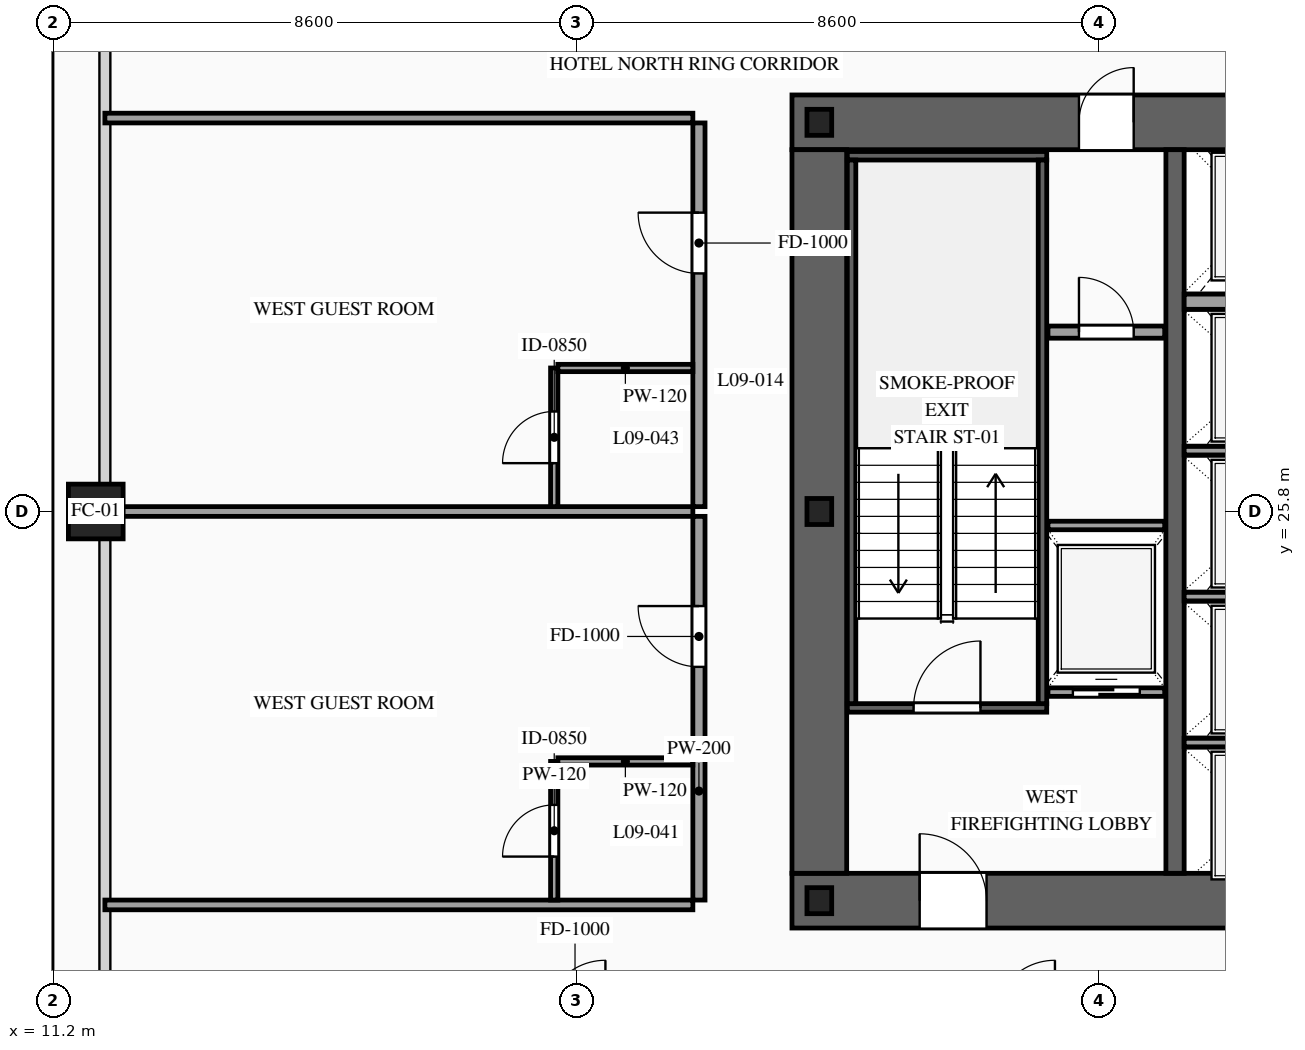
"""IFC4 building model, lengths in metres.
Left out: names, types, materials, properties, quantities, classifications, styles, units other than length and angle.
Written with IfcOpenShell. Run it as: python <this file> out.ifc"""

import sys

from ifc_helpers import new_model, si_unit, direction, frame, frame_2d, origin, origin_2d, place, context, subcontext, project, spatial, rectangle, hollow_rectangle, i_section, extrude, source, transform, mapped, element, fill, save


model = new_model("IFC4")
c1 = context("Model", 3, precision=1e-05, world=origin(), true_north=direction((0.0, 1.0)))
c2 = subcontext(c1, "Body", "Model", "MODEL_VIEW")
j1 = project(units=[si_unit("LENGTHUNIT", "METRE"), si_unit("PLANEANGLEUNIT", "RADIAN")], contexts=[c1])
p1 = place(None, origin())
s1 = spatial("IfcSite", under=j1, at=p1, CompositionType="ELEMENT")
p2 = place(p1, origin())
s2 = spatial("IfcBuilding", under=s1, at=p2, CompositionType="ELEMENT")
p3 = place(p2, frame((0.0, 0.0, 37.8)))
s3 = spatial("IfcBuildingStorey", under=s2, at=p3, CompositionType="ELEMENT", Elevation=37.8)
p4 = place(p3, frame((23.35, 19.4, 0.0), z_axis=(0.0, 0.0, 1.0), x_axis=(1.0, 0.0, 0.0)))
e1 = element("IfcWall", 1, at=p4, inside=s3, PredefinedType="SHEAR", context=c2, shape_type="SweptSolid", body=[
    extrude(rectangle(XDim=27.3, YDim=0.9, at=frame_2d((13.65, 0.0))), origin(), (0.0, 0.0, 1.0), 3.6),
])
p5 = place(p4, frame((2.1, 0.0, 0.0)))
e2 = element("IfcOpeningElement", 2, at=p5, cuts=e1, PredefinedType="OPENING", context=c2, shape_type="SweptSolid", body=[
    extrude(rectangle(XDim=1.1, YDim=2.2, at=frame_2d((0.55, 1.1))), frame((0.0, 0.465, 0.0), z_axis=(0.0, -1.0, 0.0), x_axis=(1.0, 0.0, 0.0)), (0.0, 0.0, 1.0), 0.93),
])
p6 = place(p4, frame((10.0, 0.0, 0.0)))
e3 = element("IfcOpeningElement", 3, at=p6, cuts=e1, PredefinedType="OPENING", context=c2, shape_type="SweptSolid", body=[
    extrude(rectangle(XDim=1.1, YDim=2.2, at=frame_2d((0.55, 1.1))), frame((0.0, 0.465, 0.0), z_axis=(0.0, -1.0, 0.0), x_axis=(1.0, 0.0, 0.0)), (0.0, 0.0, 1.0), 0.93),
])
p7 = place(p4, frame((23.2, 0.0, 0.0)))
e4 = element("IfcOpeningElement", 4, at=p7, cuts=e1, PredefinedType="OPENING", context=c2, shape_type="SweptSolid", body=[
    extrude(rectangle(XDim=1.1, YDim=2.2, at=frame_2d((0.55, 1.1))), frame((0.0, 0.465, 0.0), z_axis=(0.0, -1.0, 0.0), x_axis=(1.0, 0.0, 0.0)), (0.0, 0.0, 1.0), 0.93),
])
p8 = place(p4, frame((19.82, 0.0, 0.0)))
e5 = element("IfcOpeningElement", 5, at=p8, cuts=e1, PredefinedType="OPENING", context=c2, shape_type="SweptSolid", body=[
    extrude(rectangle(XDim=0.9, YDim=2.15, at=frame_2d((0.45, 1.075))), frame((0.0, 0.465, 0.0), z_axis=(0.0, -1.0, 0.0), x_axis=(1.0, 0.0, 0.0)), (0.0, 0.0, 1.0), 0.93),
])
p9 = place(p4, frame((18.38, 0.0, 0.0)))
e6 = element("IfcOpeningElement", 6, at=p9, cuts=e1, PredefinedType="OPENING", context=c2, shape_type="SweptSolid", body=[
    extrude(rectangle(XDim=0.9, YDim=2.15, at=frame_2d((0.45, 1.075))), frame((0.0, 0.465, 0.0), z_axis=(0.0, -1.0, 0.0), x_axis=(1.0, 0.0, 0.0)), (0.0, 0.0, 1.0), 0.93),
])
p10 = place(p3, frame((23.35, 32.2, 0.0), z_axis=(0.0, 0.0, 1.0), x_axis=(1.0, 0.0, 0.0)))
e7 = element("IfcWall", 7, at=p10, inside=s3, PredefinedType="SHEAR", context=c2, shape_type="SweptSolid", body=[
    extrude(rectangle(XDim=27.3, YDim=0.9, at=frame_2d((13.65, 0.0))), origin(), (0.0, 0.0, 1.0), 3.6),
])
p11 = place(p10, frame((4.72, 0.0, 0.0)))
e8 = element("IfcOpeningElement", 8, at=p11, cuts=e7, PredefinedType="OPENING", context=c2, shape_type="SweptSolid", body=[
    extrude(rectangle(XDim=0.9, YDim=2.15, at=frame_2d((0.45, 1.075))), frame((0.0, 0.465, 0.0), z_axis=(0.0, -1.0, 0.0), x_axis=(1.0, 0.0, 0.0)), (0.0, 0.0, 1.0), 0.93),
])
p12 = place(p10, frame((10.0, 0.0, 0.0)))
e9 = element("IfcOpeningElement", 9, at=p12, cuts=e7, PredefinedType="OPENING", context=c2, shape_type="SweptSolid", body=[
    extrude(rectangle(XDim=1.1, YDim=2.2, at=frame_2d((0.55, 1.1))), frame((0.0, 0.465, 0.0), z_axis=(0.0, -1.0, 0.0), x_axis=(1.0, 0.0, 0.0)), (0.0, 0.0, 1.0), 0.93),
])
p13 = place(p10, frame((15.85, 0.0, 0.0)))
e10 = element("IfcOpeningElement", 10, at=p13, cuts=e7, PredefinedType="OPENING", context=c2, shape_type="SweptSolid", body=[
    extrude(rectangle(XDim=1.1, YDim=2.2, at=frame_2d((0.55, 1.1))), frame((0.0, 0.465, 0.0), z_axis=(0.0, -1.0, 0.0), x_axis=(1.0, 0.0, 0.0)), (0.0, 0.0, 1.0), 0.93),
])
m1 = source(origin(), c2, "Body", "SweptSolid", [
    extrude(rectangle(XDim=11.9, YDim=0.9, at=frame_2d((5.95, 0.0))), origin(), (0.0, 0.0, 1.0), 3.6),
])
p14 = place(p3, frame((23.8, 19.85, 0.0), z_axis=(0.0, 0.0, 1.0), x_axis=(0.0, 1.0, 0.0)))
e11 = element("IfcWall", 11, at=p14, inside=s3, PredefinedType="SHEAR", context=c2, shape_type="MappedRepresentation", body=[
    mapped(m1, transform((0.0, 0.0, 0.0), scale=1.0)),
])
m2 = source(origin(), c2, "Body", "SweptSolid", [
    extrude(rectangle(XDim=11.9, YDim=0.3, at=frame_2d((5.95, 0.0))), origin(), (0.0, 0.0, 1.0), 3.6),
])
p15 = place(p3, frame((29.65, 19.85, 0.0), z_axis=(0.0, 0.0, 1.0), x_axis=(0.0, 1.0, 0.0)))
e12 = element("IfcWall", 12, at=p15, inside=s3, PredefinedType="SOLIDWALL", context=c2, shape_type="MappedRepresentation", body=[
    mapped(m2, transform((0.0, 0.0, 0.0), scale=1.0)),
])
m3 = source(origin(), c2, "Body", "SweptSolid", [
    extrude(i_section(OverallWidth=0.407, OverallDepth=0.428, WebThickness=0.02, FlangeThickness=0.035, at=origin_2d()), origin(), (0.0, 0.0, 1.0), 3.6),
])
for number, where, z_axis, x_axis in (
    (13, (23.8, 19.4, 0.0), (0.0, 0.0, 1.0), (1.0, 0.0, 0.0)),
    (14, (23.8, 25.8, 0.0), (0.0, 0.0, 1.0), (1.0, 0.0, 0.0)),
    (15, (23.8, 32.2, 0.0), (0.0, 0.0, 1.0), (1.0, 0.0, 0.0)),
):
    element("IfcColumn", number, at=place(p3, frame(where, z_axis=z_axis, x_axis=x_axis)), inside=s3, PredefinedType="COLUMN", context=c2, shape_type="MappedRepresentation", body=[
        mapped(m3, transform((0.0, 0.0, 0.0), scale=1.0)),
    ])
m4 = source(origin(), c2, "Body", "SweptSolid", [
    extrude(hollow_rectangle(XDim=0.9, YDim=0.9, WallThickness=0.042, at=origin_2d()), origin(), (0.0, 0.0, 1.0), 3.6),
])
p16 = place(p3, frame((11.9, 25.8, 0.0), z_axis=(0.0, 0.0, 1.0), x_axis=(1.0, 0.0, 0.0)))
e16 = element("IfcColumn", 16, at=p16, inside=s3, PredefinedType="COLUMN", context=c2, shape_type="MappedRepresentation", body=[
    mapped(m4, transform((0.0, 0.0, 0.0), scale=1.0)),
])
p17 = place(p3, frame((27.56, 22.83, 0.0), z_axis=(0.0, 0.0, 1.0), x_axis=(1.0, 0.0, 0.0)))
e17 = element("IfcWall", 17, at=p17, inside=s3, PredefinedType="SOLIDWALL", context=c2, shape_type="SweptSolid", body=[
    extrude(rectangle(XDim=1.92, YDim=0.14, at=frame_2d((0.96, 0.0))), origin(), (0.0, 0.0, 1.0), 3.32),
])
p18 = place(p17, frame((0.41, 0.0, 0.0)))
e18 = element("IfcOpeningElement", 18, at=p18, cuts=e17, PredefinedType="OPENING", context=c2, shape_type="SweptSolid", body=[
    extrude(rectangle(XDim=1.1, YDim=2.2, at=frame_2d((0.55, 1.1))), frame((0.0, 0.085, 0.0), z_axis=(0.0, -1.0, 0.0), x_axis=(1.0, 0.0, 0.0)), (0.0, 0.0, 1.0), 0.17),
])
m5 = source(origin(), c2, "Body", "SweptSolid", [
    extrude(rectangle(XDim=1.92, YDim=0.14, at=frame_2d((0.96, 0.0))), origin(), (0.0, 0.0, 1.0), 3.32),
])
p19 = place(p3, frame((27.56, 25.57, 0.0), z_axis=(0.0, 0.0, 1.0), x_axis=(1.0, 0.0, 0.0)))
e19 = element("IfcWall", 19, at=p19, inside=s3, PredefinedType="SOLIDWALL", context=c2, shape_type="MappedRepresentation", body=[
    mapped(m5, transform((0.0, 0.0, 0.0), scale=1.0)),
])
m6 = source(origin(), c2, "Body", "SweptSolid", [
    extrude(rectangle(XDim=2.5, YDim=0.14, at=frame_2d((1.25, 0.0))), origin(), (0.0, 0.0, 1.0), 3.32),
])
for number, where, z_axis, x_axis in (
    (20, (29.8, 22.0, 0.0), (0.0, 0.0, 1.0), (1.0, 0.0, 0.0)),
    (21, (29.8, 24.4, 0.0), (0.0, 0.0, 1.0), (1.0, 0.0, 0.0)),
    (22, (29.8, 26.8, 0.0), (0.0, 0.0, 1.0), (1.0, 0.0, 0.0)),
):
    element("IfcWall", number, at=place(p3, frame(where, z_axis=z_axis, x_axis=x_axis)), inside=s3, PredefinedType="SOLIDWALL", context=c2, shape_type="MappedRepresentation", body=[
        mapped(m6, transform((0.0, 0.0, 0.0), scale=1.0)),
    ])
m7 = source(origin(), c2, "Body", "SweptSolid", [
    extrude(rectangle(XDim=2.5, YDim=0.25, at=frame_2d((1.25, 0.0))), origin(), (0.0, 0.0, 1.0), 3.32),
])
p20 = place(p3, frame((29.8, 29.25, 0.0), z_axis=(0.0, 0.0, 1.0), x_axis=(1.0, 0.0, 0.0)))
e23 = element("IfcWall", 23, at=p20, inside=s3, PredefinedType="SOLIDWALL", context=c2, shape_type="MappedRepresentation", body=[
    mapped(m7, transform((0.0, 0.0, 0.0), scale=1.0)),
])
p21 = place(p3, frame((24.26, 22.57, 0.0), z_axis=(0.0, 0.0, 1.0), x_axis=(1.0, 0.0, 0.0)))
e24 = element("IfcWall", 24, at=p21, inside=s3, PredefinedType="SOLIDWALL", context=c2, shape_type="SweptSolid", body=[
    extrude(rectangle(XDim=3.28, YDim=0.14, at=frame_2d((1.64, 0.0))), origin(), (0.0, 0.0, 1.0), 3.32),
])
p22 = place(p21, frame((1.09, 0.0, 0.0)))
e25 = element("IfcOpeningElement", 25, at=p22, cuts=e24, PredefinedType="OPENING", context=c2, shape_type="SweptSolid", body=[
    extrude(rectangle(XDim=1.1, YDim=2.2, at=frame_2d((0.55, 1.1))), frame((0.0, 0.085, 0.0), z_axis=(0.0, -1.0, 0.0), x_axis=(1.0, 0.0, 0.0)), (0.0, 0.0, 1.0), 0.17),
])
m8 = source(origin(), c2, "Body", "SweptSolid", [
    extrude(rectangle(XDim=3.28, YDim=0.14, at=frame_2d((1.64, 0.0))), origin(), (0.0, 0.0, 1.0), 3.32),
])
p23 = place(p3, frame((24.26, 31.65, 0.0), z_axis=(0.0, 0.0, 1.0), x_axis=(1.0, 0.0, 0.0)))
e26 = element("IfcWall", 26, at=p23, inside=s3, PredefinedType="SOLIDWALL", context=c2, shape_type="MappedRepresentation", body=[
    mapped(m8, transform((0.0, 0.0, 0.0), scale=1.0)),
])
m9 = source(origin(), c2, "Body", "SweptSolid", [
    extrude(rectangle(XDim=8.94, YDim=0.14, at=frame_2d((4.47, 0.0))), origin(), (0.0, 0.0, 1.0), 3.32),
])
for number, where, z_axis, x_axis in (
    (27, (24.33, 22.64, 0.0), (0.0, 0.0, 1.0), (0.0, 1.0, 0.0)),
    (28, (27.47, 22.64, 0.0), (0.0, 0.0, 1.0), (0.0, 1.0, 0.0)),
):
    element("IfcWall", number, at=place(p3, frame(where, z_axis=z_axis, x_axis=x_axis)), inside=s3, PredefinedType="SOLIDWALL", context=c2, shape_type="MappedRepresentation", body=[
        mapped(m9, transform((0.0, 0.0, 0.0), scale=1.0)),
    ])
p24 = place(p3, frame((27.56, 28.75, 0.0), z_axis=(0.0, 0.0, 1.0), x_axis=(1.0, 0.0, 0.0)))
e29 = element("IfcWall", 29, at=p24, inside=s3, PredefinedType="PARTITIONING", context=c2, shape_type="SweptSolid", body=[
    extrude(rectangle(XDim=1.92, YDim=0.2, at=frame_2d((0.96, 0.0))), origin(), (0.0, 0.0, 1.0), 3.32),
])
p25 = place(p24, frame((0.51, 0.0, 0.0)))
e30 = element("IfcOpeningElement", 30, at=p25, cuts=e29, PredefinedType="OPENING", context=c2, shape_type="SweptSolid", body=[
    extrude(rectangle(XDim=0.9, YDim=2.15, at=frame_2d((0.45, 1.075))), frame((0.0, 0.115, 0.0), z_axis=(0.0, -1.0, 0.0), x_axis=(1.0, 0.0, 0.0)), (0.0, 0.0, 1.0), 0.23),
])
p26 = place(p3, frame((21.82, 19.41, 0.0), z_axis=(0.0, 0.0, 1.0), x_axis=(0.0, 1.0, 0.0)))
e31 = element("IfcWall", 31, at=p26, inside=s3, PredefinedType="PARTITIONING", context=c2, shape_type="SweptSolid", body=[
    extrude(rectangle(XDim=6.31, YDim=0.2, at=frame_2d((3.155, 0.0))), origin(), (0.0, 0.0, 1.0), 3.32),
])
p27 = place(p26, frame((3.835, 0.0, 0.0)))
e32 = element("IfcOpeningElement", 32, at=p27, cuts=e31, PredefinedType="OPENING", context=c2, shape_type="SweptSolid", body=[
    extrude(rectangle(XDim=1.0, YDim=2.2, at=frame_2d((0.5, 1.1))), frame((0.0, 0.115, 0.0), z_axis=(0.0, -1.0, 0.0), x_axis=(1.0, 0.0, 0.0)), (0.0, 0.0, 1.0), 0.23),
])
m10 = source(origin(), c2, "Body", "SweptSolid", [
    extrude(rectangle(XDim=9.67, YDim=0.16, at=frame_2d((4.835, 0.0))), origin(), (0.0, 0.0, 1.0), 2.515),
])
p28 = place(p3, frame((12.05, 25.8, 0.0), z_axis=(0.0, 0.0, 1.0), x_axis=(1.0, 0.0, 0.0)))
e33 = element("IfcWall", 33, at=p28, inside=s3, PredefinedType="PARTITIONING", context=c2, shape_type="MappedRepresentation", body=[
    mapped(m10, transform((0.0, 0.0, 0.0), scale=1.0)),
])
m11 = source(origin(), c2, "Body", "SweptSolid", [
    extrude(rectangle(XDim=9.67, YDim=0.16, at=frame_2d((4.835, 0.0))), origin(), (0.0, 0.0, 1.0), 2.815),
])
p29 = place(p3, frame((12.05, 19.33, 0.0), z_axis=(0.0, 0.0, 1.0), x_axis=(1.0, 0.0, 0.0)))
e34 = element("IfcWall", 34, at=p29, inside=s3, PredefinedType="PARTITIONING", context=c2, shape_type="MappedRepresentation", body=[
    mapped(m11, transform((0.0, 0.0, 0.0), scale=1.0)),
])
p30 = place(p3, frame((19.44, 19.41, 0.0), z_axis=(0.0, 0.0, 1.0), x_axis=(0.0, 1.0, 0.0)))
e35 = element("IfcWall", 35, at=p30, inside=s3, PredefinedType="PARTITIONING", context=c2, shape_type="SweptSolid", body=[
    extrude(rectangle(XDim=2.28, YDim=0.12, at=frame_2d((1.14, 0.0))), origin(), (0.0, 0.0, 1.0), 3.32),
])
p31 = place(p30, frame((0.715, 0.0, 0.0)))
e36 = element("IfcOpeningElement", 36, at=p31, cuts=e35, PredefinedType="OPENING", context=c2, shape_type="SweptSolid", body=[
    extrude(rectangle(XDim=0.85, YDim=2.1, at=frame_2d((0.425, 1.05))), frame((0.0, 0.075, 0.0), z_axis=(0.0, -1.0, 0.0), x_axis=(1.0, 0.0, 0.0)), (0.0, 0.0, 1.0), 0.15),
])
m12 = source(origin(), c2, "Body", "SweptSolid", [
    extrude(rectangle(XDim=2.22, YDim=0.12, at=frame_2d((1.11, 0.0))), origin(), (0.0, 0.0, 1.0), 3.32),
])
p32 = place(p3, frame((19.5, 21.69, 0.0), z_axis=(0.0, 0.0, 1.0), x_axis=(1.0, 0.0, 0.0)))
e37 = element("IfcWall", 37, at=p32, inside=s3, PredefinedType="PARTITIONING", context=c2, shape_type="MappedRepresentation", body=[
    mapped(m12, transform((0.0, 0.0, 0.0), scale=1.0)),
])
p33 = place(p3, frame((21.82, 25.88, 0.0), z_axis=(0.0, 0.0, 1.0), x_axis=(0.0, 1.0, 0.0)))
e38 = element("IfcWall", 38, at=p33, inside=s3, PredefinedType="PARTITIONING", context=c2, shape_type="SweptSolid", body=[
    extrude(rectangle(XDim=6.31, YDim=0.2, at=frame_2d((3.155, 0.0))), origin(), (0.0, 0.0, 1.0), 3.32),
])
p34 = place(p33, frame((3.835, 0.0, 0.0)))
e39 = element("IfcOpeningElement", 39, at=p34, cuts=e38, PredefinedType="OPENING", context=c2, shape_type="SweptSolid", body=[
    extrude(rectangle(XDim=1.0, YDim=2.2, at=frame_2d((0.5, 1.1))), frame((0.0, 0.115, 0.0), z_axis=(0.0, -1.0, 0.0), x_axis=(1.0, 0.0, 0.0)), (0.0, 0.0, 1.0), 0.23),
])
p35 = place(p3, frame((12.05, 32.27, 0.0), z_axis=(0.0, 0.0, 1.0), x_axis=(1.0, 0.0, 0.0)))
e40 = element("IfcWall", 40, at=p35, inside=s3, PredefinedType="PARTITIONING", context=c2, shape_type="MappedRepresentation", body=[
    mapped(m11, transform((0.0, 0.0, 0.0), scale=1.0)),
])
p36 = place(p3, frame((19.44, 25.88, 0.0), z_axis=(0.0, 0.0, 1.0), x_axis=(0.0, 1.0, 0.0)))
e41 = element("IfcWall", 41, at=p36, inside=s3, PredefinedType="PARTITIONING", context=c2, shape_type="SweptSolid", body=[
    extrude(rectangle(XDim=2.28, YDim=0.12, at=frame_2d((1.14, 0.0))), origin(), (0.0, 0.0, 1.0), 3.32),
])
p37 = place(p36, frame((0.715, 0.0, 0.0)))
e42 = element("IfcOpeningElement", 42, at=p37, cuts=e41, PredefinedType="OPENING", context=c2, shape_type="SweptSolid", body=[
    extrude(rectangle(XDim=0.85, YDim=2.1, at=frame_2d((0.425, 1.05))), frame((0.0, 0.075, 0.0), z_axis=(0.0, -1.0, 0.0), x_axis=(1.0, 0.0, 0.0)), (0.0, 0.0, 1.0), 0.15),
])
p38 = place(p3, frame((19.5, 28.16, 0.0), z_axis=(0.0, 0.0, 1.0), x_axis=(1.0, 0.0, 0.0)))
e43 = element("IfcWall", 43, at=p38, inside=s3, PredefinedType="PARTITIONING", context=c2, shape_type="MappedRepresentation", body=[
    mapped(m12, transform((0.0, 0.0, 0.0), scale=1.0)),
])
m13 = source(origin(), c2, "Body", "SweptSolid", [
    extrude(rectangle(XDim=1.1, YDim=2.2, at=frame_2d((0.55, 1.1))), frame((0.0, 0.025, 0.0), z_axis=(0.0, -1.0, 0.0), x_axis=(1.0, 0.0, 0.0)), (0.0, 0.0, 1.0), 0.05),
])
p39 = place(p18, origin())
e44 = element("IfcDoor", 44, at=p39, inside=s3, OperationType="SLIDING_TO_LEFT", PredefinedType="DOOR", context=c2, shape_type="MappedRepresentation", body=[
    mapped(m13, transform((0.0, 0.0, 0.0), scale=1.0)),
])
fill(e18, e44)
m14 = source(origin(), c2, "Body", "SweptSolid", [
    extrude(rectangle(XDim=1.1, YDim=2.2, at=frame_2d((0.55, 1.1))), frame((0.0, 0.025, 0.0), z_axis=(0.0, -1.0, 0.0), x_axis=(1.0, 0.0, 0.0)), (0.0, 0.0, 1.0), 0.05),
])
p40 = place(p22, origin())
e45 = element("IfcDoor", 45, at=p40, inside=s3, OperationType="SINGLE_SWING_RIGHT", PredefinedType="DOOR", context=c2, shape_type="MappedRepresentation", body=[
    mapped(m14, transform((0.0, 0.0, 0.0), scale=1.0)),
])
fill(e25, e45)
p41 = place(p5, origin())
e46 = element("IfcDoor", 46, at=p41, inside=s3, OperationType="SINGLE_SWING_LEFT", PredefinedType="DOOR", context=c2, shape_type="MappedRepresentation", body=[
    mapped(m14, transform((0.0, 0.0, 0.0), scale=1.0)),
])
fill(e2, e46)
m15 = source(origin(), c2, "Body", "SweptSolid", [
    extrude(rectangle(XDim=0.9, YDim=2.15, at=frame_2d((0.45, 1.075))), frame((0.0, 0.025, 0.0), z_axis=(0.0, -1.0, 0.0), x_axis=(1.0, 0.0, 0.0)), (0.0, 0.0, 1.0), 0.05),
])
p42 = place(p11, origin())
e47 = element("IfcDoor", 47, at=p42, inside=s3, OperationType="SINGLE_SWING_RIGHT", PredefinedType="DOOR", context=c2, shape_type="MappedRepresentation", body=[
    mapped(m15, transform((0.0, 0.0, 0.0), scale=1.0)),
])
fill(e8, e47)
p43 = place(p25, origin())
e48 = element("IfcDoor", 48, at=p43, inside=s3, OperationType="SINGLE_SWING_LEFT", PredefinedType="DOOR", context=c2, shape_type="MappedRepresentation", body=[
    mapped(m15, transform((0.0, 0.0, 0.0), scale=1.0)),
])
fill(e30, e48)
m16 = source(origin(), c2, "Body", "SweptSolid", [
    extrude(rectangle(XDim=1.0, YDim=2.2, at=frame_2d((0.5, 1.1))), frame((0.0, 0.025, 0.0), z_axis=(0.0, -1.0, 0.0), x_axis=(1.0, 0.0, 0.0)), (0.0, 0.0, 1.0), 0.05),
])
p44 = place(p27, origin())
e49 = element("IfcDoor", 49, at=p44, inside=s3, OperationType="SINGLE_SWING_RIGHT", PredefinedType="DOOR", context=c2, shape_type="MappedRepresentation", body=[
    mapped(m16, transform((0.0, 0.0, 0.0), scale=1.0)),
])
fill(e32, e49)
m17 = source(origin(), c2, "Body", "SweptSolid", [
    extrude(rectangle(XDim=0.85, YDim=2.1, at=frame_2d((0.425, 1.05))), frame((0.0, 0.025, 0.0), z_axis=(0.0, -1.0, 0.0), x_axis=(1.0, 0.0, 0.0)), (0.0, 0.0, 1.0), 0.05),
])
p45 = place(p31, origin())
e50 = element("IfcDoor", 50, at=p45, inside=s3, OperationType="SINGLE_SWING_LEFT", PredefinedType="DOOR", context=c2, shape_type="MappedRepresentation", body=[
    mapped(m17, transform((0.0, 0.0, 0.0), scale=1.0)),
])
fill(e36, e50)
p46 = place(p34, origin())
e51 = element("IfcDoor", 51, at=p46, inside=s3, OperationType="SINGLE_SWING_RIGHT", PredefinedType="DOOR", context=c2, shape_type="MappedRepresentation", body=[
    mapped(m16, transform((0.0, 0.0, 0.0), scale=1.0)),
])
fill(e39, e51)
p47 = place(p37, origin())
e52 = element("IfcDoor", 52, at=p47, inside=s3, OperationType="SINGLE_SWING_LEFT", PredefinedType="DOOR", context=c2, shape_type="MappedRepresentation", body=[
    mapped(m17, transform((0.0, 0.0, 0.0), scale=1.0)),
])
fill(e42, e52)
save(model, sys.argv[1])
